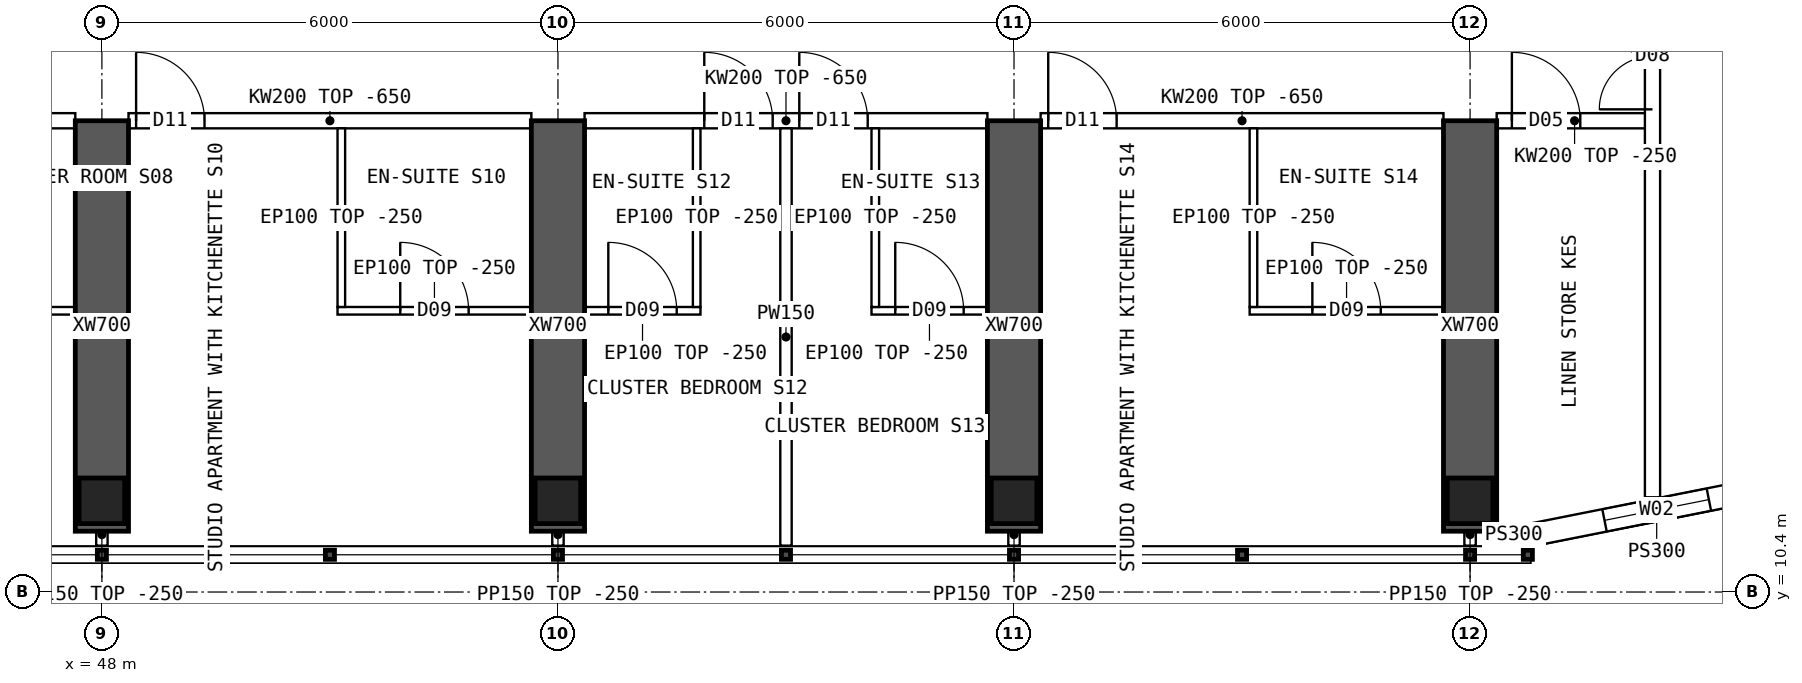
"""IFC4 building model, lengths in metres.
Left out: names, types, materials, properties, quantities, classifications, styles, units other than length and angle.
Written with IfcOpenShell. Run it as: python <this file> out.ifc"""

import sys

from ifc_helpers import new_model, si_unit, direction, frame, frame_2d, origin, origin_2d, place, context, subcontext, project, spatial, polyline, rectangle, hollow_rectangle, outline, extrude, element, fill, save


model = new_model("IFC4")
c1 = context("Model", 3, precision=1e-05, world=origin(), true_north=direction((0.0, 1.0)))
c2 = subcontext(c1, "Body", "Model", "MODEL_VIEW")
j1 = project(units=[si_unit("LENGTHUNIT", "METRE"), si_unit("PLANEANGLEUNIT", "RADIAN")], contexts=[c1])
p1 = place(None, origin())
s1 = spatial("IfcSite", under=j1, at=p1, CompositionType="ELEMENT")
p2 = place(p1, origin())
s2 = spatial("IfcBuilding", under=s1, at=p2, CompositionType="ELEMENT")
p3 = place(p2, frame((0.0, 0.0, 216.55)))
s3 = spatial("IfcBuildingStorey", under=s2, at=p3, CompositionType="ELEMENT", Elevation=216.55)
for number, where, z_axis, x_axis in (
    (1, (48.0, 11.6, 0.0), (0.0, 0.0, 1.0), (1.0, 0.0, 0.0)),
    (2, (54.0, 11.6, 0.0), (0.0, 0.0, 1.0), (1.0, 0.0, 0.0)),
    (3, (60.0, 11.6, 0.0), (0.0, 0.0, 1.0), (1.0, 0.0, 0.0)),
    (4, (66.0, 11.6, 0.0), (0.0, 0.0, 1.0), (1.0, 0.0, 0.0)),
):
    element("IfcColumn", number, at=place(p3, frame(where, z_axis=z_axis, x_axis=x_axis)), inside=s3, PredefinedType="COLUMN", context=c2, shape_type="SweptSolid", body=[
        extrude(hollow_rectangle(XDim=0.6, YDim=0.6, WallThickness=0.06, at=origin_2d()), origin(), (0.0, 0.0, 1.0), 3.75),
    ])
for number, where, z_axis, x_axis in (
    (5, (48.0, 11.2, 0.0), (0.0, 0.0, 1.0), (0.0, 1.0, 0.0)),
    (6, (54.0, 11.2, 0.0), (0.0, 0.0, 1.0), (0.0, 1.0, 0.0)),
    (7, (60.0, 11.2, 0.0), (0.0, 0.0, 1.0), (0.0, 1.0, 0.0)),
    (8, (66.0, 11.2, 0.0), (0.0, 0.0, 1.0), (0.0, 1.0, 0.0)),
):
    element("IfcWall", number, at=place(p3, frame(where, z_axis=z_axis, x_axis=x_axis)), inside=s3, PredefinedType="SHEAR", context=c2, shape_type="SweptSolid", body=[
        extrude(rectangle(XDim=5.4, YDim=0.7, at=frame_2d((2.7, 0.0))), origin(), (0.0, 0.0, 1.0), 3.75),
    ])
p4 = place(p3, frame((66.8, 11.15, 0.0), z_axis=(0.0, 0.0, 1.0), x_axis=(0.98078325777, 0.195100490205, 0.0)))
e9 = element("IfcWall", 9, at=p4, inside=s3, PredefinedType="SOLIDWALL", context=c2, shape_type="SweptSolid", body=[
    extrude(outline(polyline([(-0.03, -0.15), (3.405, -0.15), (3.345, 0.15), (0.03, 0.15), (-0.03, -0.15)])), origin(), (0.0, 0.0, 1.0), 3.5),
])
p5 = place(p4, frame((0.988, 0.0, 0.9)))
e10 = element("IfcOpeningElement", 10, at=p5, cuts=e9, PredefinedType="OPENING", context=c2, shape_type="SweptSolid", body=[
    extrude(rectangle(XDim=1.4, YDim=1.8, at=frame_2d((0.7, 0.9))), frame((0.0, 0.16, 0.0), z_axis=(0.0, -1.0, 0.0), x_axis=(1.0, 0.0, 0.0)), (0.0, 0.0, 1.0), 0.32),
])
p6 = place(p3, frame((66.8, 11.15, 0.0), z_axis=(0.0, 0.0, 1.0), x_axis=(-1.0, 0.0, 0.0)))
e11 = element("IfcWall", 11, at=p6, inside=s3, PredefinedType="SOLIDWALL", context=c2, shape_type="SweptSolid", body=[
    extrude(rectangle(XDim=0.45, YDim=0.3, at=frame_2d((0.225, 0.0))), origin(), (0.0, 0.0, 1.0), 3.5),
])
p7 = place(p3, frame((42.35, 16.6, 0.0), z_axis=(0.0, 0.0, 1.0), x_axis=(1.0, 0.0, 0.0)))
e12 = element("IfcWall", 12, at=p7, inside=s3, PredefinedType="SOLIDWALL", context=c2, shape_type="SweptSolid", body=[
    extrude(outline(polyline([(0.0, 0.0), (5.3, 0.0), (5.3, 3.1), (0.0, 3.1), (0.0, 0.0)])), frame((0.0, 0.1, 0.0), z_axis=(0.0, -1.0, 0.0), x_axis=(1.0, 0.0, 0.0)), (0.0, 0.0, 1.0), 0.2),
])
p8 = place(p7, frame((2.3, 0.0, 0.0)))
e13 = element("IfcOpeningElement", 13, at=p8, cuts=e12, PredefinedType="OPENING", context=c2, shape_type="SweptSolid", body=[
    extrude(rectangle(XDim=0.9, YDim=2.1, at=frame_2d((0.45, 1.05))), frame((0.0, 0.11, 0.0), z_axis=(0.0, -1.0, 0.0), x_axis=(1.0, 0.0, 0.0)), (0.0, 0.0, 1.0), 0.22),
])
p9 = place(p3, frame((48.35, 16.6, 0.0), z_axis=(0.0, 0.0, 1.0), x_axis=(1.0, 0.0, 0.0)))
e14 = element("IfcWall", 14, at=p9, inside=s3, PredefinedType="SOLIDWALL", context=c2, shape_type="SweptSolid", body=[
    extrude(outline(polyline([(0.0, 0.0), (5.3, 0.0), (5.3, 3.1), (0.0, 3.1), (0.0, 0.0)])), frame((0.0, 0.1, 0.0), z_axis=(0.0, -1.0, 0.0), x_axis=(1.0, 0.0, 0.0)), (0.0, 0.0, 1.0), 0.2),
])
p10 = place(p9, frame((0.1, 0.0, 0.0)))
e15 = element("IfcOpeningElement", 15, at=p10, cuts=e14, PredefinedType="OPENING", context=c2, shape_type="SweptSolid", body=[
    extrude(rectangle(XDim=0.9, YDim=2.1, at=frame_2d((0.45, 1.05))), frame((0.0, 0.11, 0.0), z_axis=(0.0, -1.0, 0.0), x_axis=(1.0, 0.0, 0.0)), (0.0, 0.0, 1.0), 0.22),
])
p11 = place(p3, frame((54.35, 16.6, 0.0), z_axis=(0.0, 0.0, 1.0), x_axis=(1.0, 0.0, 0.0)))
e16 = element("IfcWall", 16, at=p11, inside=s3, PredefinedType="SOLIDWALL", context=c2, shape_type="SweptSolid", body=[
    extrude(outline(polyline([(0.0, 0.0), (5.3, 0.0), (5.3, 3.1), (0.0, 3.1), (0.0, 0.0)])), frame((0.0, 0.1, 0.0), z_axis=(0.0, -1.0, 0.0), x_axis=(1.0, 0.0, 0.0)), (0.0, 0.0, 1.0), 0.2),
])
p12 = place(p11, frame((1.575, 0.0, 0.0)))
e17 = element("IfcOpeningElement", 17, at=p12, cuts=e16, PredefinedType="OPENING", context=c2, shape_type="SweptSolid", body=[
    extrude(rectangle(XDim=0.9, YDim=2.1, at=frame_2d((0.45, 1.05))), frame((0.0, 0.11, 0.0), z_axis=(0.0, -1.0, 0.0), x_axis=(1.0, 0.0, 0.0)), (0.0, 0.0, 1.0), 0.22),
])
p13 = place(p11, frame((2.825, 0.0, 0.0)))
e18 = element("IfcOpeningElement", 18, at=p13, cuts=e16, PredefinedType="OPENING", context=c2, shape_type="SweptSolid", body=[
    extrude(rectangle(XDim=0.9, YDim=2.1, at=frame_2d((0.45, 1.05))), frame((0.0, 0.11, 0.0), z_axis=(0.0, -1.0, 0.0), x_axis=(1.0, 0.0, 0.0)), (0.0, 0.0, 1.0), 0.22),
])
p14 = place(p3, frame((60.35, 16.6, 0.0), z_axis=(0.0, 0.0, 1.0), x_axis=(1.0, 0.0, 0.0)))
e19 = element("IfcWall", 19, at=p14, inside=s3, PredefinedType="SOLIDWALL", context=c2, shape_type="SweptSolid", body=[
    extrude(outline(polyline([(0.0, 0.0), (5.3, 0.0), (5.3, 3.1), (0.0, 3.1), (0.0, 0.0)])), frame((0.0, 0.1, 0.0), z_axis=(0.0, -1.0, 0.0), x_axis=(1.0, 0.0, 0.0)), (0.0, 0.0, 1.0), 0.2),
])
p15 = place(p14, frame((0.1, 0.0, 0.0)))
e20 = element("IfcOpeningElement", 20, at=p15, cuts=e19, PredefinedType="OPENING", context=c2, shape_type="SweptSolid", body=[
    extrude(rectangle(XDim=0.9, YDim=2.1, at=frame_2d((0.45, 1.05))), frame((0.0, 0.11, 0.0), z_axis=(0.0, -1.0, 0.0), x_axis=(1.0, 0.0, 0.0)), (0.0, 0.0, 1.0), 0.22),
])
p16 = place(p3, frame((66.35, 16.6, 0.0), z_axis=(0.0, 0.0, 1.0), x_axis=(1.0, 0.0, 0.0)))
e21 = element("IfcWall", 21, at=p16, inside=s3, PredefinedType="SOLIDWALL", context=c2, shape_type="SweptSolid", body=[
    extrude(rectangle(XDim=2.05, YDim=0.2, at=frame_2d((1.025, 0.0))), origin(), (0.0, 0.0, 1.0), 3.5),
])
p17 = place(p16, frame((0.2, 0.0, 0.0)))
e22 = element("IfcOpeningElement", 22, at=p17, cuts=e21, PredefinedType="OPENING", context=c2, shape_type="SweptSolid", body=[
    extrude(rectangle(XDim=0.9, YDim=2.1, at=frame_2d((0.45, 1.05))), frame((0.0, 0.11, 0.0), z_axis=(0.0, -1.0, 0.0), x_axis=(1.0, 0.0, 0.0)), (0.0, 0.0, 1.0), 0.22),
])
p18 = place(p3, frame((47.65, 14.1, 0.0), z_axis=(0.0, 0.0, 1.0), x_axis=(-1.0, 0.0, 0.0)))
e23 = element("IfcWall", 23, at=p18, inside=s3, PredefinedType="PARTITIONING", context=c2, shape_type="SweptSolid", body=[
    extrude(rectangle(XDim=3.15, YDim=0.1, at=frame_2d((1.575, 0.0))), origin(), (0.0, 0.0, 1.0), 3.5),
])
p19 = place(p18, frame((2.1, 0.0, 0.0)))
e24 = element("IfcOpeningElement", 24, at=p19, cuts=e23, PredefinedType="OPENING", context=c2, shape_type="SweptSolid", body=[
    extrude(rectangle(XDim=0.8, YDim=2.1, at=frame_2d((0.4, 1.05))), frame((0.0, 0.06, 0.0), z_axis=(0.0, -1.0, 0.0), x_axis=(1.0, 0.0, 0.0)), (0.0, 0.0, 1.0), 0.12),
])
p20 = place(p3, frame((53.65, 14.1, 0.0), z_axis=(0.0, 0.0, 1.0), x_axis=(-1.0, 0.0, 0.0)))
e25 = element("IfcWall", 25, at=p20, inside=s3, PredefinedType="PARTITIONING", context=c2, shape_type="SweptSolid", body=[
    extrude(rectangle(XDim=2.55, YDim=0.1, at=frame_2d((1.275, 0.0))), origin(), (0.0, 0.0, 1.0), 3.5),
])
p21 = place(p20, frame((0.825, 0.0, 0.0)))
e26 = element("IfcOpeningElement", 26, at=p21, cuts=e25, PredefinedType="OPENING", context=c2, shape_type="SweptSolid", body=[
    extrude(rectangle(XDim=0.9, YDim=2.1, at=frame_2d((0.45, 1.05))), frame((0.0, 0.06, 0.0), z_axis=(0.0, -1.0, 0.0), x_axis=(1.0, 0.0, 0.0)), (0.0, 0.0, 1.0), 0.12),
])
p22 = place(p3, frame((51.15, 14.15, 0.0), z_axis=(0.0, 0.0, 1.0), x_axis=(0.0, 1.0, 0.0)))
e27 = element("IfcWall", 27, at=p22, inside=s3, PredefinedType="PARTITIONING", context=c2, shape_type="SweptSolid", body=[
    extrude(outline(polyline([(0.0, 0.0), (2.35, 0.0), (2.35, 3.1), (2.302, 3.1), (2.3, 3.5), (0.0, 3.5), (0.0, 0.0)])), frame((0.0, 0.05, 0.0), z_axis=(0.0, -1.0, 0.0), x_axis=(1.0, 0.0, 0.0)), (0.0, 0.0, 1.0), 0.1),
])
p23 = place(p3, frame((57.0, 11.01, 0.0), z_axis=(0.0, 0.0, 1.0), x_axis=(0.0, 1.0, 0.0)))
e28 = element("IfcWall", 28, at=p23, inside=s3, PredefinedType="PARTITIONING", context=c2, shape_type="SweptSolid", body=[
    extrude(outline(polyline([(0.0, 0.0), (5.49, 0.0), (5.49, 3.1), (5.442, 3.1), (5.44, 3.5), (0.792, 3.5), (0.79, 3.1), (0.392, 3.1), (0.39, 3.5), (0.0, 3.5), (0.0, 0.0)])), frame((0.0, 0.075, 0.0), z_axis=(0.0, -1.0, 0.0), x_axis=(1.0, 0.0, 0.0)), (0.0, 0.0, 1.0), 0.15),
])
p24 = place(p3, frame((55.875, 14.1, 0.0), z_axis=(0.0, 0.0, 1.0), x_axis=(-1.0, 0.0, 0.0)))
e29 = element("IfcWall", 29, at=p24, inside=s3, PredefinedType="PARTITIONING", context=c2, shape_type="SweptSolid", body=[
    extrude(rectangle(XDim=1.525, YDim=0.1, at=frame_2d((0.762, 0.0))), origin(), (0.0, 0.0, 1.0), 3.5),
])
p25 = place(p24, frame((0.312, 0.0, 0.0)))
e30 = element("IfcOpeningElement", 30, at=p25, cuts=e29, PredefinedType="OPENING", context=c2, shape_type="SweptSolid", body=[
    extrude(rectangle(XDim=0.9, YDim=2.1, at=frame_2d((0.45, 1.05))), frame((0.0, 0.06, 0.0), z_axis=(0.0, -1.0, 0.0), x_axis=(1.0, 0.0, 0.0)), (0.0, 0.0, 1.0), 0.12),
])
p26 = place(p3, frame((55.825, 14.15, 0.0), z_axis=(0.0, 0.0, 1.0), x_axis=(0.0, 1.0, 0.0)))
e31 = element("IfcWall", 31, at=p26, inside=s3, PredefinedType="PARTITIONING", context=c2, shape_type="SweptSolid", body=[
    extrude(outline(polyline([(0.0, 0.0), (2.35, 0.0), (2.35, 3.1), (2.302, 3.1), (2.3, 3.5), (0.0, 3.5), (0.0, 0.0)])), frame((0.0, 0.05, 0.0), z_axis=(0.0, -1.0, 0.0), x_axis=(1.0, 0.0, 0.0)), (0.0, 0.0, 1.0), 0.1),
])
p27 = place(p3, frame((59.65, 14.1, 0.0), z_axis=(0.0, 0.0, 1.0), x_axis=(-1.0, 0.0, 0.0)))
e32 = element("IfcWall", 32, at=p27, inside=s3, PredefinedType="PARTITIONING", context=c2, shape_type="SweptSolid", body=[
    extrude(rectangle(XDim=1.525, YDim=0.1, at=frame_2d((0.762, 0.0))), origin(), (0.0, 0.0, 1.0), 3.5),
])
p28 = place(p27, frame((0.312, 0.0, 0.0)))
e33 = element("IfcOpeningElement", 33, at=p28, cuts=e32, PredefinedType="OPENING", context=c2, shape_type="SweptSolid", body=[
    extrude(rectangle(XDim=0.9, YDim=2.1, at=frame_2d((0.45, 1.05))), frame((0.0, 0.06, 0.0), z_axis=(0.0, -1.0, 0.0), x_axis=(1.0, 0.0, 0.0)), (0.0, 0.0, 1.0), 0.12),
])
p29 = place(p3, frame((58.175, 14.15, 0.0), z_axis=(0.0, 0.0, 1.0), x_axis=(0.0, 1.0, 0.0)))
e34 = element("IfcWall", 34, at=p29, inside=s3, PredefinedType="PARTITIONING", context=c2, shape_type="SweptSolid", body=[
    extrude(outline(polyline([(0.0, 0.0), (2.35, 0.0), (2.35, 3.1), (2.302, 3.1), (2.3, 3.5), (0.0, 3.5), (0.0, 0.0)])), frame((0.0, 0.05, 0.0), z_axis=(0.0, -1.0, 0.0), x_axis=(1.0, 0.0, 0.0)), (0.0, 0.0, 1.0), 0.1),
])
p30 = place(p3, frame((65.65, 14.1, 0.0), z_axis=(0.0, 0.0, 1.0), x_axis=(-1.0, 0.0, 0.0)))
e35 = element("IfcWall", 35, at=p30, inside=s3, PredefinedType="PARTITIONING", context=c2, shape_type="SweptSolid", body=[
    extrude(rectangle(XDim=2.55, YDim=0.1, at=frame_2d((1.275, 0.0))), origin(), (0.0, 0.0, 1.0), 3.5),
])
p31 = place(p30, frame((0.825, 0.0, 0.0)))
e36 = element("IfcOpeningElement", 36, at=p31, cuts=e35, PredefinedType="OPENING", context=c2, shape_type="SweptSolid", body=[
    extrude(rectangle(XDim=0.9, YDim=2.1, at=frame_2d((0.45, 1.05))), frame((0.0, 0.06, 0.0), z_axis=(0.0, -1.0, 0.0), x_axis=(1.0, 0.0, 0.0)), (0.0, 0.0, 1.0), 0.12),
])
p32 = place(p3, frame((63.15, 14.15, 0.0), z_axis=(0.0, 0.0, 1.0), x_axis=(0.0, 1.0, 0.0)))
e37 = element("IfcWall", 37, at=p32, inside=s3, PredefinedType="PARTITIONING", context=c2, shape_type="SweptSolid", body=[
    extrude(outline(polyline([(0.0, 0.0), (2.35, 0.0), (2.35, 3.1), (2.302, 3.1), (2.3, 3.5), (0.0, 3.5), (0.0, 0.0)])), frame((0.0, 0.05, 0.0), z_axis=(0.0, -1.0, 0.0), x_axis=(1.0, 0.0, 0.0)), (0.0, 0.0, 1.0), 0.1),
])
p33 = place(p3, frame((68.4, 11.646, 0.0), z_axis=(0.0, 0.0, 1.0), x_axis=(0.0, 1.0, 0.0)))
e38 = element("IfcWall", 38, at=p33, inside=s3, PredefinedType="SOLIDWALL", context=c2, shape_type="SweptSolid", body=[
    extrude(rectangle(XDim=40.708, YDim=0.2, at=frame_2d((20.354, 0.0))), origin(), (0.0, 0.0, 1.0), 3.5),
])
p34 = place(p33, frame((13.434, 0.0, 0.0)))
e39 = element("IfcOpeningElement", 39, at=p34, cuts=e38, PredefinedType="OPENING", context=c2, shape_type="SweptSolid", body=[
    extrude(rectangle(XDim=1.2, YDim=2.1, at=frame_2d((0.6, 1.05))), frame((0.0, 0.11, 0.0), z_axis=(0.0, -1.0, 0.0), x_axis=(1.0, 0.0, 0.0)), (0.0, 0.0, 1.0), 0.22),
])
p35 = place(p33, frame((26.074, 0.0, 0.0)))
e40 = element("IfcOpeningElement", 40, at=p35, cuts=e38, PredefinedType="OPENING", context=c2, shape_type="SweptSolid", body=[
    extrude(rectangle(XDim=1.2, YDim=2.1, at=frame_2d((0.6, 1.05))), frame((0.0, 0.11, 0.0), z_axis=(0.0, -1.0, 0.0), x_axis=(1.0, 0.0, 0.0)), (0.0, 0.0, 1.0), 0.22),
])
p36 = place(p33, frame((5.104, 0.0, 0.0)))
e41 = element("IfcOpeningElement", 41, at=p36, cuts=e38, PredefinedType="OPENING", context=c2, shape_type="SweptSolid", body=[
    extrude(rectangle(XDim=1.4, YDim=2.1, at=frame_2d((0.7, 1.05))), frame((0.0, 0.11, 0.0), z_axis=(0.0, -1.0, 0.0), x_axis=(1.0, 0.0, 0.0)), (0.0, 0.0, 1.0), 0.22),
])
p37 = place(p33, frame((34.104, 0.0, 0.0)))
e42 = element("IfcOpeningElement", 42, at=p37, cuts=e38, PredefinedType="OPENING", context=c2, shape_type="SweptSolid", body=[
    extrude(rectangle(XDim=1.4, YDim=2.1, at=frame_2d((0.7, 1.05))), frame((0.0, 0.11, 0.0), z_axis=(0.0, -1.0, 0.0), x_axis=(1.0, 0.0, 0.0)), (0.0, 0.0, 1.0), 0.22),
])
for number, where, z_axis, x_axis in (
    (43, (48.0, 11.3, 0.0), (0.0, 0.0, 1.0), (0.0, -1.0, 0.0)),
    (44, (54.0, 11.3, 0.0), (0.0, 0.0, 1.0), (0.0, -1.0, 0.0)),
    (45, (60.0, 11.3, 0.0), (0.0, 0.0, 1.0), (0.0, -1.0, 0.0)),
    (46, (66.0, 11.3, 0.0), (0.0, 0.0, 1.0), (0.0, -1.0, 0.0)),
):
    element("IfcWall", number, at=place(p3, frame(where, z_axis=z_axis, x_axis=x_axis)), inside=s3, PredefinedType="PARTITIONING", context=c2, shape_type="SweptSolid", body=[
        extrude(rectangle(XDim=0.29, YDim=0.15, at=frame_2d((0.145, 0.0))), origin(), (0.0, 0.0, 1.0), 3.5),
    ])
p38 = place(p5, origin())
e47 = element("IfcWindow", 47, at=p38, inside=s3, PartitioningType="SINGLE_PANEL", PredefinedType="WINDOW", context=c2, shape_type="SweptSolid", body=[
    extrude(rectangle(XDim=1.4, YDim=1.8, at=frame_2d((0.7, 0.9))), frame((0.0, 0.03, 0.0), z_axis=(0.0, -1.0, 0.0), x_axis=(1.0, 0.0, 0.0)), (0.0, 0.0, 1.0), 0.06),
])
fill(e10, e47)
p39 = place(p21, origin())
e48 = element("IfcDoor", 48, at=p39, inside=s3, OperationType="SINGLE_SWING_RIGHT", PredefinedType="DOOR", context=c2, shape_type="SweptSolid", body=[
    extrude(rectangle(XDim=0.9, YDim=2.1, at=frame_2d((0.45, 1.05))), frame((0.0, 0.025, 0.0), z_axis=(0.0, -1.0, 0.0), x_axis=(1.0, 0.0, 0.0)), (0.0, 0.0, 1.0), 0.05),
])
fill(e26, e48)
p40 = place(p10, origin())
e49 = element("IfcDoor", 49, at=p40, inside=s3, OperationType="SINGLE_SWING_LEFT", PredefinedType="DOOR", context=c2, shape_type="SweptSolid", body=[
    extrude(rectangle(XDim=0.9, YDim=2.1, at=frame_2d((0.45, 1.05))), frame((0.0, 0.025, 0.0), z_axis=(0.0, -1.0, 0.0), x_axis=(1.0, 0.0, 0.0)), (0.0, 0.0, 1.0), 0.05),
])
fill(e15, e49)
p41 = place(p25, origin())
e50 = element("IfcDoor", 50, at=p41, inside=s3, OperationType="SINGLE_SWING_RIGHT", PredefinedType="DOOR", context=c2, shape_type="SweptSolid", body=[
    extrude(rectangle(XDim=0.9, YDim=2.1, at=frame_2d((0.45, 1.05))), frame((0.0, 0.025, 0.0), z_axis=(0.0, -1.0, 0.0), x_axis=(1.0, 0.0, 0.0)), (0.0, 0.0, 1.0), 0.05),
])
fill(e30, e50)
p42 = place(p12, origin())
e51 = element("IfcDoor", 51, at=p42, inside=s3, OperationType="SINGLE_SWING_LEFT", PredefinedType="DOOR", context=c2, shape_type="SweptSolid", body=[
    extrude(rectangle(XDim=0.9, YDim=2.1, at=frame_2d((0.45, 1.05))), frame((0.0, 0.025, 0.0), z_axis=(0.0, -1.0, 0.0), x_axis=(1.0, 0.0, 0.0)), (0.0, 0.0, 1.0), 0.05),
])
fill(e17, e51)
p43 = place(p28, origin())
e52 = element("IfcDoor", 52, at=p43, inside=s3, OperationType="SINGLE_SWING_RIGHT", PredefinedType="DOOR", context=c2, shape_type="SweptSolid", body=[
    extrude(rectangle(XDim=0.9, YDim=2.1, at=frame_2d((0.45, 1.05))), frame((0.0, 0.025, 0.0), z_axis=(0.0, -1.0, 0.0), x_axis=(1.0, 0.0, 0.0)), (0.0, 0.0, 1.0), 0.05),
])
fill(e33, e52)
p44 = place(p13, origin())
e53 = element("IfcDoor", 53, at=p44, inside=s3, OperationType="SINGLE_SWING_LEFT", PredefinedType="DOOR", context=c2, shape_type="SweptSolid", body=[
    extrude(rectangle(XDim=0.9, YDim=2.1, at=frame_2d((0.45, 1.05))), frame((0.0, 0.025, 0.0), z_axis=(0.0, -1.0, 0.0), x_axis=(1.0, 0.0, 0.0)), (0.0, 0.0, 1.0), 0.05),
])
fill(e18, e53)
p45 = place(p31, origin())
e54 = element("IfcDoor", 54, at=p45, inside=s3, OperationType="SINGLE_SWING_RIGHT", PredefinedType="DOOR", context=c2, shape_type="SweptSolid", body=[
    extrude(rectangle(XDim=0.9, YDim=2.1, at=frame_2d((0.45, 1.05))), frame((0.0, 0.025, 0.0), z_axis=(0.0, -1.0, 0.0), x_axis=(1.0, 0.0, 0.0)), (0.0, 0.0, 1.0), 0.05),
])
fill(e36, e54)
p46 = place(p15, origin())
e55 = element("IfcDoor", 55, at=p46, inside=s3, OperationType="SINGLE_SWING_LEFT", PredefinedType="DOOR", context=c2, shape_type="SweptSolid", body=[
    extrude(rectangle(XDim=0.9, YDim=2.1, at=frame_2d((0.45, 1.05))), frame((0.0, 0.025, 0.0), z_axis=(0.0, -1.0, 0.0), x_axis=(1.0, 0.0, 0.0)), (0.0, 0.0, 1.0), 0.05),
])
fill(e20, e55)
p47 = place(p36, origin())
e56 = element("IfcDoor", 56, at=p47, inside=s3, OperationType="DOUBLE_DOOR_SINGLE_SWING", PredefinedType="DOOR", context=c2, shape_type="SweptSolid", body=[
    extrude(rectangle(XDim=1.4, YDim=2.1, at=frame_2d((0.7, 1.05))), frame((0.0, 0.025, 0.0), z_axis=(0.0, -1.0, 0.0), x_axis=(1.0, 0.0, 0.0)), (0.0, 0.0, 1.0), 0.05),
])
fill(e41, e56)
p48 = place(p17, origin())
e57 = element("IfcDoor", 57, at=p48, inside=s3, OperationType="SINGLE_SWING_LEFT", PredefinedType="DOOR", context=c2, shape_type="SweptSolid", body=[
    extrude(rectangle(XDim=0.9, YDim=2.1, at=frame_2d((0.45, 1.05))), frame((0.0, 0.025, 0.0), z_axis=(0.0, -1.0, 0.0), x_axis=(1.0, 0.0, 0.0)), (0.0, 0.0, 1.0), 0.05),
])
fill(e22, e57)
save(model, sys.argv[1])
